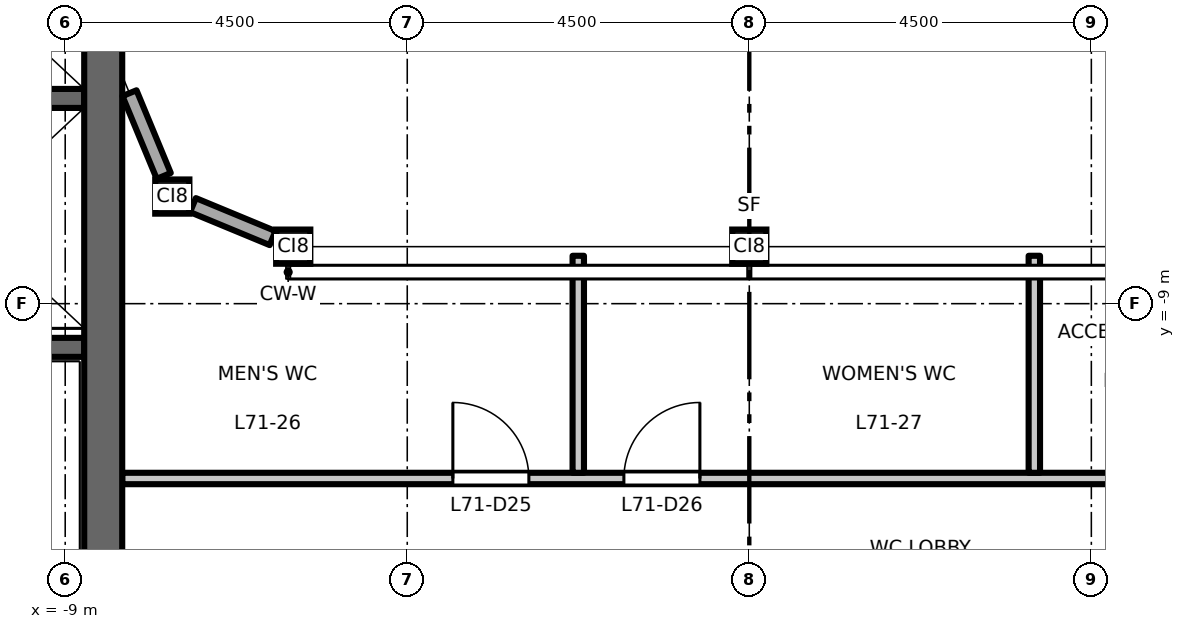
"""IFC4 building model, lengths in metres.
Left out: names, types, materials, properties, quantities, classifications, styles, units other than length and angle.
Written with IfcOpenShell. Run it as: python <this file> out.ifc"""

import sys

from ifc_helpers import new_model, si_unit, direction, frame, frame_2d, origin, origin_2d, place, context, subcontext, project, spatial, rectangle, hollow_rectangle, extrude, element, fill, save


model = new_model("IFC4")
c1 = context("Model", 3, precision=1e-05, world=origin(), true_north=direction((0.0, 1.0)))
c2 = subcontext(c1, "Body", "Model", "MODEL_VIEW")
j1 = project(units=[si_unit("LENGTHUNIT", "METRE"), si_unit("PLANEANGLEUNIT", "RADIAN")], contexts=[c1])
p1 = place(None, origin())
s1 = spatial("IfcSite", under=j1, at=p1, CompositionType="ELEMENT")
p2 = place(p1, origin())
s2 = spatial("IfcBuilding", under=s1, at=p2, CompositionType="ELEMENT")
p3 = place(p2, frame((0.0, 0.0, 330.2)))
s3 = spatial("IfcBuildingStorey", under=s2, at=p3, CompositionType="ELEMENT", Elevation=330.2)
for number, where, z_axis, x_axis in (
    (1, (-7.591, -7.591, 0.0), (0.0, 0.0, 1.0), (1.0, 0.0, 0.0)),
    (2, (-6.0, -8.25, 0.0), (0.0, 0.0, 1.0), (1.0, 0.0, 0.0)),
    (3, (0.0, -8.25, 0.0), (0.0, 0.0, 1.0), (1.0, 0.0, 0.0)),
):
    element("IfcColumn", number, at=place(p3, frame(where, z_axis=z_axis, x_axis=x_axis)), inside=s3, PredefinedType="COLUMN", context=c2, shape_type="SweptSolid", body=[
        extrude(hollow_rectangle(XDim=0.45, YDim=0.45, WallThickness=0.022, at=origin_2d()), origin(), (0.0, 0.0, 1.0), 4.5),
    ])
p4 = place(p3, frame((-8.75, -6.3, 0.0), z_axis=(0.0, 0.0, 1.0), x_axis=(-1.0, 0.0, 0.0)))
e4 = element("IfcWall", 4, at=p4, inside=s3, PredefinedType="SHEAR", context=c2, shape_type="SweptSolid", body=[
    extrude(rectangle(XDim=3.1, YDim=0.25, at=frame_2d((1.55, 0.0))), origin(), (0.0, 0.0, 1.0), 4.35),
])
p5 = place(p3, frame((-8.75, -9.575, 0.0), z_axis=(0.0, 0.0, 1.0), x_axis=(-1.0, 0.0, 0.0)))
e5 = element("IfcWall", 5, at=p5, inside=s3, PredefinedType="SHEAR", context=c2, shape_type="SweptSolid", body=[
    extrude(rectangle(XDim=8.0, YDim=0.25, at=frame_2d((4.0, 0.0))), origin(), (0.0, 0.0, 1.0), 4.35),
])
p6 = place(p5, frame((6.65, 0.0, 0.0)))
e6 = element("IfcOpeningElement", 6, at=p6, cuts=e5, PredefinedType="OPENING", context=c2, shape_type="SweptSolid", body=[
    extrude(rectangle(XDim=1.1, YDim=2.1, at=frame_2d((0.55, 1.05))), frame((0.0, 0.135, 0.0), z_axis=(0.0, -1.0, 0.0), x_axis=(1.0, 0.0, 0.0)), (0.0, 0.0, 1.0), 0.27),
])
p7 = place(p3, frame((-8.5, -13.0, 0.0), z_axis=(0.0, 0.0, 1.0), x_axis=(0.0, 1.0, 0.0)))
e7 = element("IfcWall", 7, at=p7, inside=s3, PredefinedType="SHEAR", context=c2, shape_type="SweptSolid", body=[
    extrude(rectangle(XDim=26.0, YDim=0.5, at=frame_2d((13.0, 0.0))), origin(), (0.0, 0.0, 1.0), 4.35),
])
p8 = place(p3, frame((-8.154, -6.231, 0.0), z_axis=(0.0, 0.0, 1.0), x_axis=(0.382760542083, -0.92384758885, 0.0)))
e8 = element("IfcWall", 8, at=p8, inside=s3, PredefinedType="STANDARD", context=c2, shape_type="SweptSolid", body=[
    extrude(rectangle(XDim=1.178, YDim=0.2, at=frame_2d((0.589, 0.0))), origin(), (0.0, 0.0, 1.0), 4.01),
])
p9 = place(p3, frame((-7.319, -7.703, 0.0), z_axis=(0.0, 0.0, 1.0), x_axis=(0.923864661962, -0.382719331074, 0.0)))
e9 = element("IfcWall", 9, at=p9, inside=s3, PredefinedType="STANDARD", context=c2, shape_type="SweptSolid", body=[
    extrude(rectangle(XDim=1.134, YDim=0.2, at=frame_2d((0.567, 0.0))), origin(), (0.0, 0.0, 1.0), 4.01),
])
p10 = place(p3, frame((-8.25, -11.3, 0.0), z_axis=(0.0, 0.0, 1.0), x_axis=(1.0, 0.0, 0.0)))
e10 = element("IfcWall", 10, at=p10, inside=s3, PredefinedType="PARTITIONING", context=c2, shape_type="SweptSolid", body=[
    extrude(rectangle(XDim=15.03, YDim=0.15, at=frame_2d((7.515, 0.0))), origin(), (0.0, 0.0, 1.0), 4.35),
])
p11 = place(p10, frame((4.35, 0.0, 0.0)))
e11 = element("IfcOpeningElement", 11, at=p11, cuts=e10, PredefinedType="OPENING", context=c2, shape_type="SweptSolid", body=[
    extrude(rectangle(XDim=1.0, YDim=2.1, at=frame_2d((0.5, 1.05))), frame((0.0, 0.085, 0.0), z_axis=(0.0, -1.0, 0.0), x_axis=(1.0, 0.0, 0.0)), (0.0, 0.0, 1.0), 0.17),
])
p12 = place(p10, frame((6.6, 0.0, 0.0)))
e12 = element("IfcOpeningElement", 12, at=p12, cuts=e10, PredefinedType="OPENING", context=c2, shape_type="SweptSolid", body=[
    extrude(rectangle(XDim=1.0, YDim=2.1, at=frame_2d((0.5, 1.05))), frame((0.0, 0.085, 0.0), z_axis=(0.0, -1.0, 0.0), x_axis=(1.0, 0.0, 0.0)), (0.0, 0.0, 1.0), 0.17),
])
p13 = place(p10, frame((13.38, 0.0, 0.0)))
e13 = element("IfcOpeningElement", 13, at=p13, cuts=e10, PredefinedType="OPENING", context=c2, shape_type="SweptSolid", body=[
    extrude(rectangle(XDim=1.0, YDim=2.1, at=frame_2d((0.5, 1.05))), frame((0.0, 0.085, 0.0), z_axis=(0.0, -1.0, 0.0), x_axis=(1.0, 0.0, 0.0)), (0.0, 0.0, 1.0), 0.17),
])
for number, where, z_axis, x_axis in (
    (14, (-2.25, -11.225, 0.0), (0.0, 0.0, 1.0), (0.0, 1.0, 0.0)),
    (15, (3.75, -11.225, 0.0), (0.0, 0.0, 1.0), (0.0, 1.0, 0.0)),
):
    element("IfcWall", number, at=place(p3, frame(where, z_axis=z_axis, x_axis=x_axis)), inside=s3, PredefinedType="PARTITIONING", context=c2, shape_type="SweptSolid", body=[
        extrude(rectangle(XDim=2.855, YDim=0.15, at=frame_2d((1.427, 0.0))), origin(), (0.0, 0.0, 1.0), 4.35),
    ])
p14 = place(p11, origin())
e16 = element("IfcDoor", 16, at=p14, inside=s3, OperationType="SINGLE_SWING_LEFT", PredefinedType="DOOR", context=c2, shape_type="SweptSolid", body=[
    extrude(rectangle(XDim=1.0, YDim=2.1, at=frame_2d((0.5, 1.05))), frame((0.0, 0.025, 0.0), z_axis=(0.0, -1.0, 0.0), x_axis=(1.0, 0.0, 0.0)), (0.0, 0.0, 1.0), 0.05),
])
fill(e11, e16)
p15 = place(p12, origin())
e17 = element("IfcDoor", 17, at=p15, inside=s3, OperationType="SINGLE_SWING_RIGHT", PredefinedType="DOOR", context=c2, shape_type="SweptSolid", body=[
    extrude(rectangle(XDim=1.0, YDim=2.1, at=frame_2d((0.5, 1.05))), frame((0.0, 0.025, 0.0), z_axis=(0.0, -1.0, 0.0), x_axis=(1.0, 0.0, 0.0)), (0.0, 0.0, 1.0), 0.05),
])
fill(e12, e17)
save(model, sys.argv[1])
